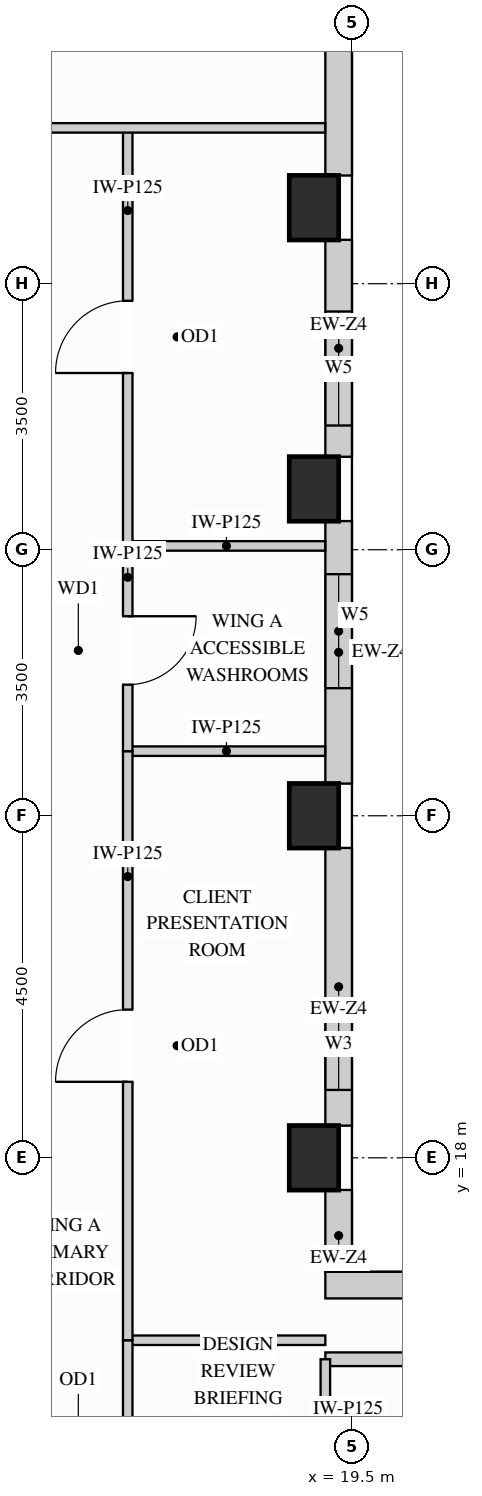
"""IFC4 building model, lengths in metres.
Left out: names, types, materials, properties, quantities, classifications, styles, units other than length and angle.
Written with IfcOpenShell. Run it as: python <this file> out.ifc"""

import sys

from ifc_helpers import new_model, si_unit, direction, frame, frame_2d, origin, origin_2d, place, context, subcontext, project, spatial, rectangle, extrude, source, transform, mapped, element, fill, save


model = new_model("IFC4")
c1 = context("Model", 3, precision=1e-05, world=origin(), true_north=direction((0.0, 1.0)))
c2 = subcontext(c1, "Body", "Model", "MODEL_VIEW")
j1 = project(units=[si_unit("LENGTHUNIT", "METRE"), si_unit("PLANEANGLEUNIT", "RADIAN")], contexts=[c1])
p1 = place(None, origin())
s1 = spatial("IfcSite", under=j1, at=p1, CompositionType="ELEMENT")
p2 = place(p1, origin())
s2 = spatial("IfcBuilding", under=s1, at=p2, CompositionType="ELEMENT")
p3 = place(p2, frame((0.0, 0.0, 241.2)))
s3 = spatial("IfcBuildingStorey", under=s2, at=p3, CompositionType="ELEMENT", Elevation=241.2)
m1 = source(origin(), c2, "Body", "SweptSolid", [
    extrude(rectangle(XDim=0.65, YDim=0.85, at=origin_2d()), origin(), (0.0, 0.0, 1.0), 3.4),
])
for number, where, z_axis, x_axis in (
    (1, (19.0, 18.0, 0.0), (0.0, 0.0, 1.0), (1.0, 0.0, 0.0)),
    (2, (19.0, 22.5, 0.0), (0.0, 0.0, 1.0), (1.0, 0.0, 0.0)),
    (3, (19.0, 26.8, 0.0), (0.0, 0.0, 1.0), (1.0, 0.0, 0.0)),
    (4, (19.0, 30.5, 0.0), (0.0, 0.0, 1.0), (1.0, 0.0, 0.0)),
):
    element("IfcColumn", number, at=place(p3, frame(where, z_axis=z_axis, x_axis=x_axis)), inside=s3, PredefinedType="COLUMN", context=c2, shape_type="MappedRepresentation", body=[
        mapped(m1, transform((0.0, 0.0, 0.0), x_axis=(1.0, 0.0, 0.0), y_axis=(0.0, 1.0, 0.0), z_axis=(0.0, 0.0, 1.0))),
    ])
m2 = source(origin(), c2, "Body", "SweptSolid", [
    extrude(rectangle(XDim=1.079, YDim=0.35, at=frame_2d((0.54, 0.0))), origin(), (0.0, 0.0, 1.0), 2.619),
])
p4 = place(p3, frame((19.325, 16.498, 0.0), z_axis=(0.0, 0.0, 1.0), x_axis=(0.0, 1.0, 0.0)))
e5 = element("IfcWall", 5, at=p4, inside=s3, PredefinedType="SOLIDWALL", context=c2, shape_type="MappedRepresentation", body=[
    mapped(m2, transform((0.0, 0.0, 0.0), x_axis=(1.0, 0.0, 0.0), y_axis=(0.0, 1.0, 0.0), z_axis=(0.0, 0.0, 1.0))),
])
p5 = place(p3, frame((19.325, 18.423, 0.0), z_axis=(0.0, 0.0, 1.0), x_axis=(0.0, 1.0, 0.0)))
e6 = element("IfcWall", 6, at=p5, inside=s3, PredefinedType="SOLIDWALL", context=c2, shape_type="SweptSolid", body=[
    extrude(rectangle(XDim=3.654, YDim=0.35, at=frame_2d((1.827, 0.0))), origin(), (0.0, 0.0, 1.0), 2.619),
])
p6 = place(p5, frame((0.47, 0.0, 0.78)))
e7 = element("IfcOpeningElement", 7, at=p6, cuts=e6, PredefinedType="OPENING", context=c2, shape_type="SweptSolid", body=[
    extrude(rectangle(XDim=1.2, YDim=1.659, at=frame_2d((0.6, 0.83))), frame((0.0, 0.185, 0.0), z_axis=(0.0, -1.0, 0.0), x_axis=(1.0, 0.0, 0.0)), (0.0, 0.0, 1.0), 0.37),
])
p7 = place(p3, frame((19.325, 22.923, 0.0), z_axis=(0.0, 0.0, 1.0), x_axis=(0.0, 1.0, 0.0)))
e8 = element("IfcWall", 8, at=p7, inside=s3, PredefinedType="SOLIDWALL", context=c2, shape_type="SweptSolid", body=[
    extrude(rectangle(XDim=3.454, YDim=0.35, at=frame_2d((1.727, 0.0))), origin(), (0.0, 0.0, 1.0), 2.619),
])
p8 = place(p7, frame((1.256, 0.0, 0.78)))
e9 = element("IfcOpeningElement", 9, at=p8, cuts=e8, PredefinedType="OPENING", context=c2, shape_type="SweptSolid", body=[
    extrude(rectangle(XDim=1.5, YDim=1.659, at=frame_2d((0.75, 0.83))), frame((0.0, 0.185, 0.0), z_axis=(0.0, -1.0, 0.0), x_axis=(1.0, 0.0, 0.0)), (0.0, 0.0, 1.0), 0.37),
])
p9 = place(p3, frame((19.325, 27.223, 0.0), z_axis=(0.0, 0.0, 1.0), x_axis=(0.0, 1.0, 0.0)))
e10 = element("IfcWall", 10, at=p9, inside=s3, PredefinedType="SOLIDWALL", context=c2, shape_type="SweptSolid", body=[
    extrude(rectangle(XDim=2.854, YDim=0.35, at=frame_2d((1.427, 0.0))), origin(), (0.0, 0.0, 1.0), 2.619),
])
p10 = place(p9, frame((0.411, 0.0, 0.78)))
e11 = element("IfcOpeningElement", 11, at=p10, cuts=e10, PredefinedType="OPENING", context=c2, shape_type="SweptSolid", body=[
    extrude(rectangle(XDim=1.5, YDim=1.659, at=frame_2d((0.75, 0.83))), frame((0.0, 0.185, 0.0), z_axis=(0.0, -1.0, 0.0), x_axis=(1.0, 0.0, 0.0)), (0.0, 0.0, 1.0), 0.37),
])
m3 = source(origin(), c2, "Body", "SweptSolid", [
    extrude(rectangle(XDim=3.654, YDim=0.35, at=frame_2d((1.827, 0.0))), origin(), (0.0, 0.0, 1.0), 2.619),
])
p11 = place(p3, frame((19.325, 30.923, 0.0), z_axis=(0.0, 0.0, 1.0), x_axis=(0.0, 1.0, 0.0)))
e12 = element("IfcWall", 12, at=p11, inside=s3, PredefinedType="SOLIDWALL", context=c2, shape_type="MappedRepresentation", body=[
    mapped(m3, transform((0.0, 0.0, 0.0), x_axis=(1.0, 0.0, 0.0), y_axis=(0.0, 1.0, 0.0), z_axis=(0.0, 0.0, 1.0))),
])
m4 = source(origin(), c2, "Body", "SweptSolid", [
    extrude(rectangle(XDim=3.927, YDim=0.35, at=frame_2d((1.963, 0.0))), origin(), (0.0, 0.0, 1.0), 3.385),
])
p12 = place(p3, frame((23.077, 16.325, 0.0), z_axis=(0.0, 0.0, 1.0), x_axis=(-1.0, 0.0, 0.0)))
e13 = element("IfcWall", 13, at=p12, inside=s3, PredefinedType="SOLIDWALL", context=c2, shape_type="MappedRepresentation", body=[
    mapped(m4, transform((0.0, 0.0, 0.0), x_axis=(1.0, 0.0, 0.0), y_axis=(0.0, 1.0, 0.0), z_axis=(0.0, 0.0, 1.0))),
])
m5 = source(origin(), c2, "Body", "SweptSolid", [
    extrude(rectangle(XDim=15.25, YDim=0.18, at=frame_2d((7.625, 0.0))), origin(), (0.0, 0.0, 1.0), 3.385),
])
p13 = place(p3, frame((19.15, 15.35, 0.0), z_axis=(0.0, 0.0, 1.0), x_axis=(1.0, 0.0, 0.0)))
e14 = element("IfcWall", 14, at=p13, inside=s3, PredefinedType="PARTITIONING", context=c2, shape_type="MappedRepresentation", body=[
    mapped(m5, transform((0.0, 0.0, 0.0), x_axis=(1.0, 0.0, 0.0), y_axis=(0.0, 1.0, 0.0), z_axis=(0.0, 0.0, 1.0))),
])
m6 = source(origin(), c2, "Body", "SweptSolid", [
    extrude(rectangle(XDim=2.6, YDim=0.125, at=frame_2d((1.3, 0.0))), origin(), (0.0, 0.0, 1.0), 3.385),
])
p14 = place(p3, frame((16.55, 15.6, 0.0), z_axis=(0.0, 0.0, 1.0), x_axis=(1.0, 0.0, 0.0)))
e15 = element("IfcWall", 15, at=p14, inside=s3, PredefinedType="PARTITIONING", context=c2, shape_type="MappedRepresentation", body=[
    mapped(m6, transform((0.0, 0.0, 0.0), x_axis=(1.0, 0.0, 0.0), y_axis=(0.0, 1.0, 0.0), z_axis=(0.0, 0.0, 1.0))),
])
m7 = source(origin(), c2, "Body", "SweptSolid", [
    extrude(rectangle(XDim=2.598, YDim=0.125, at=frame_2d((1.299, 0.0))), origin(), (0.0, 0.0, 1.0), 3.385),
])
for number, where, z_axis, x_axis in (
    (16, (16.55, 23.35, 0.0), (0.0, 0.0, 1.0), (1.0, 0.0, 0.0)),
    (17, (16.55, 26.05, 0.0), (0.0, 0.0, 1.0), (1.0, 0.0, 0.0)),
):
    element("IfcWall", number, at=place(p3, frame(where, z_axis=z_axis, x_axis=x_axis)), inside=s3, PredefinedType="PARTITIONING", context=c2, shape_type="MappedRepresentation", body=[
        mapped(m7, transform((0.0, 0.0, 0.0), x_axis=(1.0, 0.0, 0.0), y_axis=(0.0, 1.0, 0.0), z_axis=(0.0, 0.0, 1.0))),
    ])
m8 = source(origin(), c2, "Body", "SweptSolid", [
    extrude(rectangle(XDim=1.4, YDim=0.125, at=frame_2d((0.7, 0.0))), origin(), (0.0, 0.0, 1.0), 2.619),
])
p15 = place(p3, frame((19.15, 13.95, 0.0), z_axis=(0.0, 0.0, 1.0), x_axis=(0.0, 1.0, 0.0)))
e18 = element("IfcWall", 18, at=p15, inside=s3, PredefinedType="PARTITIONING", context=c2, shape_type="MappedRepresentation", body=[
    mapped(m8, transform((0.0, 0.0, 0.0), x_axis=(1.0, 0.0, 0.0), y_axis=(0.0, 1.0, 0.0), z_axis=(0.0, 0.0, 1.0))),
])
p16 = place(p3, frame((16.55, 12.35, 0.0), z_axis=(0.0, 0.0, 1.0), x_axis=(0.0, 1.0, 0.0)))
e19 = element("IfcWall", 19, at=p16, inside=s3, PredefinedType="PARTITIONING", context=c2, shape_type="SweptSolid", body=[
    extrude(rectangle(XDim=3.25, YDim=0.125, at=frame_2d((1.625, 0.0))), origin(), (0.0, 0.0, 1.0), 3.385),
])
p17 = place(p16, frame((1.15, 0.0, 0.0)))
e20 = element("IfcOpeningElement", 20, at=p17, cuts=e19, PredefinedType="OPENING", context=c2, shape_type="SweptSolid", body=[
    extrude(rectangle(XDim=0.95, YDim=2.15, at=frame_2d((0.475, 1.075))), frame((0.0, 0.073, 0.0), z_axis=(0.0, -1.0, 0.0), x_axis=(1.0, 0.0, 0.0)), (0.0, 0.0, 1.0), 0.145),
])
p18 = place(p3, frame((16.55, 15.6, 0.0), z_axis=(0.0, 0.0, 1.0), x_axis=(0.0, 1.0, 0.0)))
e21 = element("IfcWall", 21, at=p18, inside=s3, PredefinedType="PARTITIONING", context=c2, shape_type="SweptSolid", body=[
    extrude(rectangle(XDim=7.75, YDim=0.125, at=frame_2d((3.875, 0.0))), origin(), (0.0, 0.0, 1.0), 3.385),
])
p19 = place(p18, frame((3.4, 0.0, 0.0)))
e22 = element("IfcOpeningElement", 22, at=p19, cuts=e21, PredefinedType="OPENING", context=c2, shape_type="SweptSolid", body=[
    extrude(rectangle(XDim=0.95, YDim=2.15, at=frame_2d((0.475, 1.075))), frame((0.0, 0.073, 0.0), z_axis=(0.0, -1.0, 0.0), x_axis=(1.0, 0.0, 0.0)), (0.0, 0.0, 1.0), 0.145),
])
p20 = place(p3, frame((16.55, 26.05, 0.0), z_axis=(0.0, 0.0, 1.0), x_axis=(0.0, 1.0, 0.0)))
e23 = element("IfcWall", 23, at=p20, inside=s3, PredefinedType="PARTITIONING", context=c2, shape_type="SweptSolid", body=[
    extrude(rectangle(XDim=5.5, YDim=0.125, at=frame_2d((2.75, 0.0))), origin(), (0.0, 0.0, 1.0), 3.385),
])
p21 = place(p20, frame((2.275, 0.0, 0.0)))
e24 = element("IfcOpeningElement", 24, at=p21, cuts=e23, PredefinedType="OPENING", context=c2, shape_type="SweptSolid", body=[
    extrude(rectangle(XDim=0.95, YDim=2.15, at=frame_2d((0.475, 1.075))), frame((0.0, 0.073, 0.0), z_axis=(0.0, -1.0, 0.0), x_axis=(1.0, 0.0, 0.0)), (0.0, 0.0, 1.0), 0.145),
])
p22 = place(p3, frame((16.55, 23.35, 0.0), z_axis=(0.0, 0.0, 1.0), x_axis=(0.0, 1.0, 0.0)))
e25 = element("IfcWall", 25, at=p22, inside=s3, PredefinedType="PARTITIONING", context=c2, shape_type="SweptSolid", body=[
    extrude(rectangle(XDim=2.7, YDim=0.125, at=frame_2d((1.35, 0.0))), origin(), (0.0, 0.0, 1.0), 3.385),
])
p23 = place(p22, frame((0.875, 0.0, 0.0)))
e26 = element("IfcOpeningElement", 26, at=p23, cuts=e25, PredefinedType="OPENING", context=c2, shape_type="SweptSolid", body=[
    extrude(rectangle(XDim=0.9, YDim=2.15, at=frame_2d((0.45, 1.075))), frame((0.0, 0.073, 0.0), z_axis=(0.0, -1.0, 0.0), x_axis=(1.0, 0.0, 0.0)), (0.0, 0.0, 1.0), 0.145),
])
m9 = source(origin(), c2, "Body", "SweptSolid", [
    extrude(rectangle(XDim=12.598, YDim=0.125, at=frame_2d((6.299, 0.0))), origin(), (0.0, 0.0, 1.0), 3.385),
])
p24 = place(p3, frame((6.55, 31.55, 0.0), z_axis=(0.0, 0.0, 1.0), x_axis=(1.0, 0.0, 0.0)))
e27 = element("IfcWall", 27, at=p24, inside=s3, PredefinedType="PARTITIONING", context=c2, shape_type="MappedRepresentation", body=[
    mapped(m9, transform((0.0, 0.0, 0.0), x_axis=(1.0, 0.0, 0.0), y_axis=(0.0, 1.0, 0.0), z_axis=(0.0, 0.0, 1.0))),
])
m10 = source(origin(), c2, "Body", "SweptSolid", [
    extrude(rectangle(XDim=0.95, YDim=2.15, at=frame_2d((0.475, 1.075))), frame((0.0, 0.025, 0.0), z_axis=(0.0, -1.0, 0.0), x_axis=(1.0, 0.0, 0.0)), (0.0, 0.0, 1.0), 0.05),
])
p25 = place(p19, origin())
e28 = element("IfcDoor", 28, at=p25, inside=s3, OperationType="SINGLE_SWING_LEFT", PredefinedType="DOOR", context=c2, shape_type="MappedRepresentation", body=[
    mapped(m10, transform((0.0, 0.0, 0.0), x_axis=(1.0, 0.0, 0.0), y_axis=(0.0, 1.0, 0.0), z_axis=(0.0, 0.0, 1.0))),
])
fill(e22, e28)
p26 = place(p21, origin())
e29 = element("IfcDoor", 29, at=p26, inside=s3, OperationType="SINGLE_SWING_LEFT", PredefinedType="DOOR", context=c2, shape_type="MappedRepresentation", body=[
    mapped(m10, transform((0.0, 0.0, 0.0), x_axis=(1.0, 0.0, 0.0), y_axis=(0.0, 1.0, 0.0), z_axis=(0.0, 0.0, 1.0))),
])
fill(e24, e29)
m11 = source(origin(), c2, "Body", "SweptSolid", [
    extrude(rectangle(XDim=0.9, YDim=2.15, at=frame_2d((0.45, 1.075))), frame((0.0, 0.025, 0.0), z_axis=(0.0, -1.0, 0.0), x_axis=(1.0, 0.0, 0.0)), (0.0, 0.0, 1.0), 0.05),
])
p27 = place(p23, origin())
e30 = element("IfcDoor", 30, at=p27, inside=s3, OperationType="SINGLE_SWING_RIGHT", PredefinedType="DOOR", context=c2, shape_type="MappedRepresentation", body=[
    mapped(m11, transform((0.0, 0.0, 0.0), x_axis=(1.0, 0.0, 0.0), y_axis=(0.0, 1.0, 0.0), z_axis=(0.0, 0.0, 1.0))),
])
fill(e26, e30)
m12 = source(origin(), c2, "Body", "SweptSolid", [
    extrude(rectangle(XDim=1.2, YDim=1.659, at=frame_2d((0.6, 0.83))), frame((0.0, 0.03, 0.0), z_axis=(0.0, -1.0, 0.0), x_axis=(1.0, 0.0, 0.0)), (0.0, 0.0, 1.0), 0.06),
])
p28 = place(p6, origin())
e31 = element("IfcWindow", 31, at=p28, inside=s3, PartitioningType="SINGLE_PANEL", PredefinedType="WINDOW", context=c2, shape_type="MappedRepresentation", body=[
    mapped(m12, transform((0.0, 0.0, 0.0), x_axis=(1.0, 0.0, 0.0), y_axis=(0.0, 1.0, 0.0), z_axis=(0.0, 0.0, 1.0))),
])
fill(e7, e31)
m13 = source(origin(), c2, "Body", "SweptSolid", [
    extrude(rectangle(XDim=1.5, YDim=1.659, at=frame_2d((0.75, 0.83))), frame((0.0, 0.03, 0.0), z_axis=(0.0, -1.0, 0.0), x_axis=(1.0, 0.0, 0.0)), (0.0, 0.0, 1.0), 0.06),
])
p29 = place(p8, origin())
e32 = element("IfcWindow", 32, at=p29, inside=s3, PartitioningType="SINGLE_PANEL", PredefinedType="WINDOW", context=c2, shape_type="MappedRepresentation", body=[
    mapped(m13, transform((0.0, 0.0, 0.0), x_axis=(1.0, 0.0, 0.0), y_axis=(0.0, 1.0, 0.0), z_axis=(0.0, 0.0, 1.0))),
])
fill(e9, e32)
p30 = place(p10, origin())
e33 = element("IfcWindow", 33, at=p30, inside=s3, PartitioningType="SINGLE_PANEL", PredefinedType="WINDOW", context=c2, shape_type="MappedRepresentation", body=[
    mapped(m13, transform((0.0, 0.0, 0.0), x_axis=(1.0, 0.0, 0.0), y_axis=(0.0, 1.0, 0.0), z_axis=(0.0, 0.0, 1.0))),
])
fill(e11, e33)
save(model, sys.argv[1])
